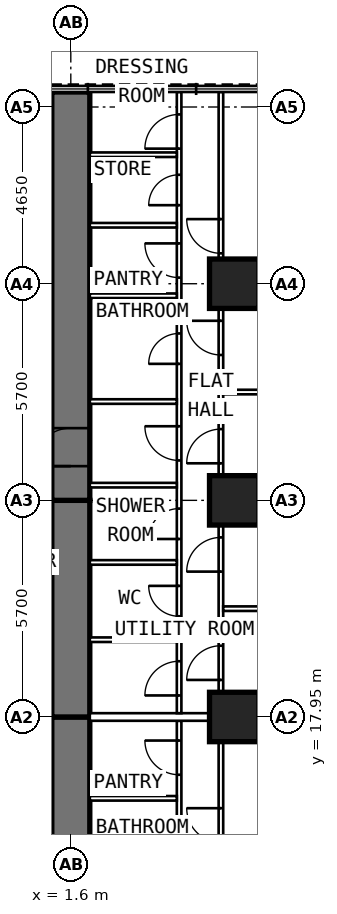
"""IFC4 building model, lengths in metres.
Left out: names, types, materials, properties, quantities, classifications, styles, units other than length and angle.
Written with IfcOpenShell. Run it as: python <this file> out.ifc"""

import sys

from ifc_helpers import new_model, si_unit, direction, frame, frame_2d, origin, origin_2d, place, context, subcontext, project, spatial, rectangle, extrude, element, fill, save


model = new_model("IFC4")
c1 = context("Model", 3, precision=1e-05, world=origin(), true_north=direction((0.0, 1.0)))
c2 = subcontext(c1, "Body", "Model", "MODEL_VIEW")
j1 = project(units=[si_unit("LENGTHUNIT", "METRE"), si_unit("PLANEANGLEUNIT", "RADIAN")], contexts=[c1])
p1 = place(None, origin())
s1 = spatial("IfcSite", under=j1, at=p1, CompositionType="ELEMENT")
p2 = place(p1, origin())
s2 = spatial("IfcBuilding", under=s1, at=p2, CompositionType="ELEMENT")
p3 = place(p2, frame((0.0, 0.0, 39.4)))
s3 = spatial("IfcBuildingStorey", under=s2, at=p3, CompositionType="ELEMENT", Elevation=39.4)
for number, where, z_axis, x_axis in (
    (1, (5.9, 17.95, 0.0), (0.0, 0.0, 1.0), (0.0, 1.0, 0.0)),
    (2, (5.9, 23.65, 0.0), (0.0, 0.0, 1.0), (0.0, 1.0, 0.0)),
    (3, (5.9, 29.35, 0.0), (0.0, 0.0, 1.0), (0.0, 1.0, 0.0)),
):
    element("IfcColumn", number, at=place(p3, frame(where, z_axis=z_axis, x_axis=x_axis)), inside=s3, PredefinedType="COLUMN", context=c2, shape_type="SweptSolid", body=[
        extrude(rectangle(XDim=1.3, YDim=1.3, at=origin_2d()), origin(), (0.0, 0.0, 1.0), 3.6),
    ])
p4 = place(p3, frame((1.6, 9.6, 0.0), z_axis=(0.0, 0.0, 1.0), x_axis=(0.0, 1.0, 0.0)))
e4 = element("IfcWall", 4, at=p4, inside=s3, PredefinedType="SHEAR", context=c2, shape_type="SweptSolid", body=[
    extrude(rectangle(XDim=8.35, YDim=1.0, at=frame_2d((4.175, 0.0))), origin(), (0.0, 0.0, 1.0), 3.6),
])
p5 = place(p4, frame((1.3, 0.0, 0.0)))
e5 = element("IfcOpeningElement", 5, at=p5, cuts=e4, PredefinedType="OPENING", context=c2, shape_type="SweptSolid", body=[
    extrude(rectangle(XDim=1.0, YDim=2.1, at=frame_2d((0.5, 1.05))), frame((0.0, 0.512, 0.0), z_axis=(0.0, -1.0, 0.0), x_axis=(1.0, 0.0, 0.0)), (0.0, 0.0, 1.0), 1.024),
])
p6 = place(p3, frame((1.6, 17.95, 0.0), z_axis=(0.0, 0.0, 1.0), x_axis=(0.0, 1.0, 0.0)))
e6 = element("IfcWall", 6, at=p6, inside=s3, PredefinedType="SHEAR", context=c2, shape_type="SweptSolid", body=[
    extrude(rectangle(XDim=5.7, YDim=1.0, at=frame_2d((2.85, 0.0))), origin(), (0.0, 0.0, 1.0), 3.6),
])
p7 = place(p3, frame((1.6, 23.65, 0.0), z_axis=(0.0, 0.0, 1.0), x_axis=(0.0, 1.0, 0.0)))
e7 = element("IfcWall", 7, at=p7, inside=s3, PredefinedType="SHEAR", context=c2, shape_type="SweptSolid", body=[
    extrude(rectangle(XDim=10.745, YDim=1.0, at=frame_2d((5.373, 0.0))), origin(), (0.0, 0.0, 1.0), 3.6),
])
p8 = place(p7, frame((0.9, 0.0, 0.0)))
e8 = element("IfcOpeningElement", 8, at=p8, cuts=e7, PredefinedType="OPENING", context=c2, shape_type="SweptSolid", body=[
    extrude(rectangle(XDim=1.0, YDim=2.1, at=frame_2d((0.5, 1.05))), frame((0.0, 0.512, 0.0), z_axis=(0.0, -1.0, 0.0), x_axis=(1.0, 0.0, 0.0)), (0.0, 0.0, 1.0), 1.024),
])
p9 = place(p3, frame((4.45, 10.1, 0.0), z_axis=(0.0, 0.0, 1.0), x_axis=(0.0, 1.0, 0.0)))
e9 = element("IfcWall", 9, at=p9, inside=s3, PredefinedType="PARTITIONING", context=c2, shape_type="SweptSolid", body=[
    extrude(rectangle(XDim=7.75, YDim=0.12, at=frame_2d((3.875, 0.0))), origin(), (0.0, 0.0, 1.0), 3.35),
])
p10 = place(p9, frame((0.75, 0.0, 0.0)))
e10 = element("IfcOpeningElement", 10, at=p10, cuts=e9, PredefinedType="OPENING", context=c2, shape_type="SweptSolid", body=[
    extrude(rectangle(XDim=0.9, YDim=2.1, at=frame_2d((0.45, 1.05))), frame((0.0, 0.072, 0.0), z_axis=(0.0, -1.0, 0.0), x_axis=(1.0, 0.0, 0.0)), (0.0, 0.0, 1.0), 0.144),
])
p11 = place(p9, frame((3.705, 0.0, 0.0)))
e11 = element("IfcOpeningElement", 11, at=p11, cuts=e9, PredefinedType="OPENING", context=c2, shape_type="SweptSolid", body=[
    extrude(rectangle(XDim=0.8, YDim=2.1, at=frame_2d((0.4, 1.05))), frame((0.0, 0.072, 0.0), z_axis=(0.0, -1.0, 0.0), x_axis=(1.0, 0.0, 0.0)), (0.0, 0.0, 1.0), 0.144),
])
p12 = place(p9, frame((6.33, 0.0, 0.0)))
e12 = element("IfcOpeningElement", 12, at=p12, cuts=e9, PredefinedType="OPENING", context=c2, shape_type="SweptSolid", body=[
    extrude(rectangle(XDim=0.9, YDim=2.1, at=frame_2d((0.45, 1.05))), frame((0.0, 0.072, 0.0), z_axis=(0.0, -1.0, 0.0), x_axis=(1.0, 0.0, 0.0)), (0.0, 0.0, 1.0), 0.144),
])
p13 = place(p3, frame((5.55, 9.691, 0.0), z_axis=(0.0, 0.0, 1.0), x_axis=(0.0, 1.0, 0.0)))
e13 = element("IfcWall", 13, at=p13, inside=s3, PredefinedType="PARTITIONING", context=c2, shape_type="SweptSolid", body=[
    extrude(rectangle(XDim=8.009, YDim=0.12, at=frame_2d((4.004, 0.0))), origin(), (0.0, 0.0, 1.0), 3.35),
])
p14 = place(p13, frame((4.959, 0.0, 0.0)))
e14 = element("IfcOpeningElement", 14, at=p14, cuts=e13, PredefinedType="OPENING", context=c2, shape_type="SweptSolid", body=[
    extrude(rectangle(XDim=0.9, YDim=2.1, at=frame_2d((0.45, 1.05))), frame((0.0, 0.072, 0.0), z_axis=(0.0, -1.0, 0.0), x_axis=(1.0, 0.0, 0.0)), (0.0, 0.0, 1.0), 0.144),
])
p15 = place(p3, frame((2.1, 15.81, 0.0), z_axis=(0.0, 0.0, 1.0), x_axis=(1.0, 0.0, 0.0)))
e15 = element("IfcWall", 15, at=p15, inside=s3, PredefinedType="PARTITIONING", context=c2, shape_type="SweptSolid", body=[
    extrude(rectangle(XDim=2.29, YDim=0.12, at=frame_2d((1.145, 0.0))), origin(), (0.0, 0.0, 1.0), 3.35),
])
p16 = place(p3, frame((4.45, 18.05, 0.0), z_axis=(0.0, 0.0, 1.0), x_axis=(0.0, 1.0, 0.0)))
e16 = element("IfcWall", 16, at=p16, inside=s3, PredefinedType="PARTITIONING", context=c2, shape_type="SweptSolid", body=[
    extrude(rectangle(XDim=16.345, YDim=0.12, at=frame_2d((8.172, 0.0))), origin(), (0.0, 0.0, 1.0), 3.35),
])
p17 = place(p16, frame((0.467, 0.0, 0.0)))
e17 = element("IfcOpeningElement", 17, at=p17, cuts=e16, PredefinedType="OPENING", context=c2, shape_type="SweptSolid", body=[
    extrude(rectangle(XDim=0.9, YDim=2.1, at=frame_2d((0.45, 1.05))), frame((0.0, 0.072, 0.0), z_axis=(0.0, -1.0, 0.0), x_axis=(1.0, 0.0, 0.0)), (0.0, 0.0, 1.0), 0.144),
])
p18 = place(p16, frame((2.55, 0.0, 0.0)))
e18 = element("IfcOpeningElement", 18, at=p18, cuts=e16, PredefinedType="OPENING", context=c2, shape_type="SweptSolid", body=[
    extrude(rectangle(XDim=0.8, YDim=2.1, at=frame_2d((0.4, 1.05))), frame((0.0, 0.072, 0.0), z_axis=(0.0, -1.0, 0.0), x_axis=(1.0, 0.0, 0.0)), (0.0, 0.0, 1.0), 0.144),
])
p19 = place(p16, frame((4.583, 0.0, 0.0)))
e19 = element("IfcOpeningElement", 19, at=p19, cuts=e16, PredefinedType="OPENING", context=c2, shape_type="SweptSolid", body=[
    extrude(rectangle(XDim=0.8, YDim=2.1, at=frame_2d((0.4, 1.05))), frame((0.0, 0.072, 0.0), z_axis=(0.0, -1.0, 0.0), x_axis=(1.0, 0.0, 0.0)), (0.0, 0.0, 1.0), 0.144),
])
p20 = place(p16, frame((6.65, 0.0, 0.0)))
e20 = element("IfcOpeningElement", 20, at=p20, cuts=e16, PredefinedType="OPENING", context=c2, shape_type="SweptSolid", body=[
    extrude(rectangle(XDim=0.9, YDim=2.1, at=frame_2d((0.45, 1.05))), frame((0.0, 0.072, 0.0), z_axis=(0.0, -1.0, 0.0), x_axis=(1.0, 0.0, 0.0)), (0.0, 0.0, 1.0), 0.144),
])
p21 = place(p16, frame((9.192, 0.0, 0.0)))
e21 = element("IfcOpeningElement", 21, at=p21, cuts=e16, PredefinedType="OPENING", context=c2, shape_type="SweptSolid", body=[
    extrude(rectangle(XDim=0.8, YDim=2.1, at=frame_2d((0.4, 1.05))), frame((0.0, 0.072, 0.0), z_axis=(0.0, -1.0, 0.0), x_axis=(1.0, 0.0, 0.0)), (0.0, 0.0, 1.0), 0.144),
])
p22 = place(p16, frame((11.461, 0.0, 0.0)))
e22 = element("IfcOpeningElement", 22, at=p22, cuts=e16, PredefinedType="OPENING", context=c2, shape_type="SweptSolid", body=[
    extrude(rectangle(XDim=0.9, YDim=2.1, at=frame_2d((0.45, 1.05))), frame((0.0, 0.072, 0.0), z_axis=(0.0, -1.0, 0.0), x_axis=(1.0, 0.0, 0.0)), (0.0, 0.0, 1.0), 0.144),
])
p23 = place(p16, frame((13.367, 0.0, 0.0)))
e23 = element("IfcOpeningElement", 23, at=p23, cuts=e16, PredefinedType="OPENING", context=c2, shape_type="SweptSolid", body=[
    extrude(rectangle(XDim=0.8, YDim=2.1, at=frame_2d((0.4, 1.05))), frame((0.0, 0.072, 0.0), z_axis=(0.0, -1.0, 0.0), x_axis=(1.0, 0.0, 0.0)), (0.0, 0.0, 1.0), 0.144),
])
p24 = place(p16, frame((14.854, 0.0, 0.0)))
e24 = element("IfcOpeningElement", 24, at=p24, cuts=e16, PredefinedType="OPENING", context=c2, shape_type="SweptSolid", body=[
    extrude(rectangle(XDim=0.9, YDim=2.1, at=frame_2d((0.45, 1.05))), frame((0.0, 0.072, 0.0), z_axis=(0.0, -1.0, 0.0), x_axis=(1.0, 0.0, 0.0)), (0.0, 0.0, 1.0), 0.144),
])
p25 = place(p3, frame((5.55, 18.05, 0.0), z_axis=(0.0, 0.0, 1.0), x_axis=(0.0, 1.0, 0.0)))
e25 = element("IfcWall", 25, at=p25, inside=s3, PredefinedType="PARTITIONING", context=c2, shape_type="SweptSolid", body=[
    extrude(rectangle(XDim=16.345, YDim=0.12, at=frame_2d((8.172, 0.0))), origin(), (0.0, 0.0, 1.0), 3.35),
])
p26 = place(p25, frame((0.875, 0.0, 0.0)))
e26 = element("IfcOpeningElement", 26, at=p26, cuts=e25, PredefinedType="OPENING", context=c2, shape_type="SweptSolid", body=[
    extrude(rectangle(XDim=0.9, YDim=2.1, at=frame_2d((0.45, 1.05))), frame((0.0, 0.072, 0.0), z_axis=(0.0, -1.0, 0.0), x_axis=(1.0, 0.0, 0.0)), (0.0, 0.0, 1.0), 0.144),
])
p27 = place(p25, frame((3.725, 0.0, 0.0)))
e27 = element("IfcOpeningElement", 27, at=p27, cuts=e25, PredefinedType="OPENING", context=c2, shape_type="SweptSolid", body=[
    extrude(rectangle(XDim=0.9, YDim=2.1, at=frame_2d((0.45, 1.05))), frame((0.0, 0.072, 0.0), z_axis=(0.0, -1.0, 0.0), x_axis=(1.0, 0.0, 0.0)), (0.0, 0.0, 1.0), 0.144),
])
p28 = place(p25, frame((6.575, 0.0, 0.0)))
e28 = element("IfcOpeningElement", 28, at=p28, cuts=e25, PredefinedType="OPENING", context=c2, shape_type="SweptSolid", body=[
    extrude(rectangle(XDim=0.9, YDim=2.1, at=frame_2d((0.45, 1.05))), frame((0.0, 0.072, 0.0), z_axis=(0.0, -1.0, 0.0), x_axis=(1.0, 0.0, 0.0)), (0.0, 0.0, 1.0), 0.144),
])
p29 = place(p25, frame((9.425, 0.0, 0.0)))
e29 = element("IfcOpeningElement", 29, at=p29, cuts=e25, PredefinedType="OPENING", context=c2, shape_type="SweptSolid", body=[
    extrude(rectangle(XDim=0.9, YDim=2.1, at=frame_2d((0.45, 1.05))), frame((0.0, 0.072, 0.0), z_axis=(0.0, -1.0, 0.0), x_axis=(1.0, 0.0, 0.0)), (0.0, 0.0, 1.0), 0.144),
])
p30 = place(p25, frame((12.1, 0.0, 0.0)))
e30 = element("IfcOpeningElement", 30, at=p30, cuts=e25, PredefinedType="OPENING", context=c2, shape_type="SweptSolid", body=[
    extrude(rectangle(XDim=0.9, YDim=2.1, at=frame_2d((0.45, 1.05))), frame((0.0, 0.072, 0.0), z_axis=(0.0, -1.0, 0.0), x_axis=(1.0, 0.0, 0.0)), (0.0, 0.0, 1.0), 0.144),
])
p31 = place(p3, frame((5.61, 20.8, 0.0), z_axis=(0.0, 0.0, 1.0), x_axis=(1.0, 0.0, 0.0)))
e31 = element("IfcWall", 31, at=p31, inside=s3, PredefinedType="PARTITIONING", context=c2, shape_type="SweptSolid", body=[
    extrude(rectangle(XDim=5.09, YDim=0.12, at=frame_2d((2.545, 0.0))), origin(), (0.0, 0.0, 1.0), 3.35),
])
p32 = place(p3, frame((5.61, 23.65, 0.0), z_axis=(0.0, 0.0, 1.0), x_axis=(1.0, 0.0, 0.0)))
e32 = element("IfcWall", 32, at=p32, inside=s3, PredefinedType="PARTITIONING", context=c2, shape_type="SweptSolid", body=[
    extrude(rectangle(XDim=5.09, YDim=0.12, at=frame_2d((2.545, 0.0))), origin(), (0.0, 0.0, 1.0), 2.45),
])
p33 = place(p3, frame((5.61, 26.5, 0.0), z_axis=(0.0, 0.0, 1.0), x_axis=(1.0, 0.0, 0.0)))
e33 = element("IfcWall", 33, at=p33, inside=s3, PredefinedType="PARTITIONING", context=c2, shape_type="SweptSolid", body=[
    extrude(rectangle(XDim=5.09, YDim=0.12, at=frame_2d((2.545, 0.0))), origin(), (0.0, 0.0, 1.0), 3.35),
])
p34 = place(p3, frame((5.61, 29.35, 0.0), z_axis=(0.0, 0.0, 1.0), x_axis=(1.0, 0.0, 0.0)))
e34 = element("IfcWall", 34, at=p34, inside=s3, PredefinedType="PARTITIONING", context=c2, shape_type="SweptSolid", body=[
    extrude(rectangle(XDim=5.09, YDim=0.12, at=frame_2d((2.545, 0.0))), origin(), (0.0, 0.0, 1.0), 2.45),
])
for number, where, z_axis, x_axis in (
    (35, (2.1, 19.983, 0.0), (0.0, 0.0, 1.0), (1.0, 0.0, 0.0)),
    (36, (2.1, 22.017, 0.0), (0.0, 0.0, 1.0), (1.0, 0.0, 0.0)),
    (37, (2.1, 24.05, 0.0), (0.0, 0.0, 1.0), (1.0, 0.0, 0.0)),
    (38, (2.1, 26.25, 0.0), (0.0, 0.0, 1.0), (1.0, 0.0, 0.0)),
):
    element("IfcWall", number, at=place(p3, frame(where, z_axis=z_axis, x_axis=x_axis)), inside=s3, PredefinedType="PARTITIONING", context=c2, shape_type="SweptSolid", body=[
        extrude(rectangle(XDim=2.29, YDim=0.12, at=frame_2d((1.145, 0.0))), origin(), (0.0, 0.0, 1.0), 3.35),
    ])
p35 = place(p3, frame((2.1, 29.033, 0.0), z_axis=(0.0, 0.0, 1.0), x_axis=(1.0, 0.0, 0.0)))
e39 = element("IfcWall", 39, at=p35, inside=s3, PredefinedType="PARTITIONING", context=c2, shape_type="SweptSolid", body=[
    extrude(rectangle(XDim=2.29, YDim=0.12, at=frame_2d((1.145, 0.0))), origin(), (0.0, 0.0, 1.0), 2.45),
])
for number, where, z_axis, x_axis in (
    (40, (2.1, 30.889, 0.0), (0.0, 0.0, 1.0), (1.0, 0.0, 0.0)),
    (41, (2.1, 32.744, 0.0), (0.0, 0.0, 1.0), (1.0, 0.0, 0.0)),
):
    element("IfcWall", number, at=place(p3, frame(where, z_axis=z_axis, x_axis=x_axis)), inside=s3, PredefinedType="PARTITIONING", context=c2, shape_type="SweptSolid", body=[
        extrude(rectangle(XDim=2.29, YDim=0.12, at=frame_2d((1.145, 0.0))), origin(), (0.0, 0.0, 1.0), 3.35),
    ])
p36 = place(p3, frame((2.1, 17.95, 0.0), z_axis=(0.0, 0.0, 1.0), x_axis=(1.0, 0.0, 0.0)))
e42 = element("IfcWall", 42, at=p36, inside=s3, PredefinedType="PARTITIONING", context=c2, shape_type="SweptSolid", body=[
    extrude(rectangle(XDim=8.6, YDim=0.2, at=frame_2d((4.3, 0.0))), origin(), (0.0, 0.0, 1.0), 2.45),
])
p37 = place(p14, origin())
e43 = element("IfcDoor", 43, at=p37, inside=s3, OperationType="SINGLE_SWING_RIGHT", PredefinedType="DOOR", context=c2, shape_type="SweptSolid", body=[
    extrude(rectangle(XDim=0.9, YDim=2.1, at=frame_2d((0.45, 1.05))), frame((0.0, 0.025, 0.0), z_axis=(0.0, -1.0, 0.0), x_axis=(1.0, 0.0, 0.0)), (0.0, 0.0, 1.0), 0.05),
])
fill(e14, e43)
p38 = place(p12, origin())
e44 = element("IfcDoor", 44, at=p38, inside=s3, OperationType="SINGLE_SWING_RIGHT", PredefinedType="DOOR", context=c2, shape_type="SweptSolid", body=[
    extrude(rectangle(XDim=0.9, YDim=2.1, at=frame_2d((0.45, 1.05))), frame((0.0, 0.025, 0.0), z_axis=(0.0, -1.0, 0.0), x_axis=(1.0, 0.0, 0.0)), (0.0, 0.0, 1.0), 0.05),
])
fill(e12, e44)
p39 = place(p8, origin())
e45 = element("IfcDoor", 45, at=p39, inside=s3, OperationType="SINGLE_SWING_LEFT", PredefinedType="DOOR", context=c2, shape_type="SweptSolid", body=[
    extrude(rectangle(XDim=1.0, YDim=2.1, at=frame_2d((0.5, 1.05))), frame((0.0, 0.25, 0.0), z_axis=(0.0, -1.0, 0.0), x_axis=(1.0, 0.0, 0.0)), (0.0, 0.0, 1.0), 0.5),
])
fill(e8, e45)
p40 = place(p26, origin())
e46 = element("IfcDoor", 46, at=p40, inside=s3, OperationType="SINGLE_SWING_LEFT", PredefinedType="DOOR", context=c2, shape_type="SweptSolid", body=[
    extrude(rectangle(XDim=0.9, YDim=2.1, at=frame_2d((0.45, 1.05))), frame((0.0, 0.025, 0.0), z_axis=(0.0, -1.0, 0.0), x_axis=(1.0, 0.0, 0.0)), (0.0, 0.0, 1.0), 0.05),
])
fill(e26, e46)
p41 = place(p27, origin())
e47 = element("IfcDoor", 47, at=p41, inside=s3, OperationType="SINGLE_SWING_LEFT", PredefinedType="DOOR", context=c2, shape_type="SweptSolid", body=[
    extrude(rectangle(XDim=0.9, YDim=2.1, at=frame_2d((0.45, 1.05))), frame((0.0, 0.025, 0.0), z_axis=(0.0, -1.0, 0.0), x_axis=(1.0, 0.0, 0.0)), (0.0, 0.0, 1.0), 0.05),
])
fill(e27, e47)
p42 = place(p28, origin())
e48 = element("IfcDoor", 48, at=p42, inside=s3, OperationType="SINGLE_SWING_LEFT", PredefinedType="DOOR", context=c2, shape_type="SweptSolid", body=[
    extrude(rectangle(XDim=0.9, YDim=2.1, at=frame_2d((0.45, 1.05))), frame((0.0, 0.025, 0.0), z_axis=(0.0, -1.0, 0.0), x_axis=(1.0, 0.0, 0.0)), (0.0, 0.0, 1.0), 0.05),
])
fill(e28, e48)
p43 = place(p29, origin())
e49 = element("IfcDoor", 49, at=p43, inside=s3, OperationType="SINGLE_SWING_RIGHT", PredefinedType="DOOR", context=c2, shape_type="SweptSolid", body=[
    extrude(rectangle(XDim=0.9, YDim=2.1, at=frame_2d((0.45, 1.05))), frame((0.0, 0.025, 0.0), z_axis=(0.0, -1.0, 0.0), x_axis=(1.0, 0.0, 0.0)), (0.0, 0.0, 1.0), 0.05),
])
fill(e29, e49)
p44 = place(p30, origin())
e50 = element("IfcDoor", 50, at=p44, inside=s3, OperationType="SINGLE_SWING_RIGHT", PredefinedType="DOOR", context=c2, shape_type="SweptSolid", body=[
    extrude(rectangle(XDim=0.9, YDim=2.1, at=frame_2d((0.45, 1.05))), frame((0.0, 0.025, 0.0), z_axis=(0.0, -1.0, 0.0), x_axis=(1.0, 0.0, 0.0)), (0.0, 0.0, 1.0), 0.05),
])
fill(e30, e50)
p45 = place(p17, origin())
e51 = element("IfcDoor", 51, at=p45, inside=s3, OperationType="SINGLE_SWING_LEFT", PredefinedType="DOOR", context=c2, shape_type="SweptSolid", body=[
    extrude(rectangle(XDim=0.9, YDim=2.1, at=frame_2d((0.45, 1.05))), frame((0.0, 0.025, 0.0), z_axis=(0.0, -1.0, 0.0), x_axis=(1.0, 0.0, 0.0)), (0.0, 0.0, 1.0), 0.05),
])
fill(e17, e51)
p46 = place(p18, origin())
e52 = element("IfcDoor", 52, at=p46, inside=s3, OperationType="SINGLE_SWING_RIGHT", PredefinedType="DOOR", context=c2, shape_type="SweptSolid", body=[
    extrude(rectangle(XDim=0.8, YDim=2.1, at=frame_2d((0.4, 1.05))), frame((0.0, 0.025, 0.0), z_axis=(0.0, -1.0, 0.0), x_axis=(1.0, 0.0, 0.0)), (0.0, 0.0, 1.0), 0.05),
])
fill(e18, e52)
p47 = place(p19, origin())
e53 = element("IfcDoor", 53, at=p47, inside=s3, OperationType="SINGLE_SWING_LEFT", PredefinedType="DOOR", context=c2, shape_type="SweptSolid", body=[
    extrude(rectangle(XDim=0.8, YDim=2.1, at=frame_2d((0.4, 1.05))), frame((0.0, 0.025, 0.0), z_axis=(0.0, -1.0, 0.0), x_axis=(1.0, 0.0, 0.0)), (0.0, 0.0, 1.0), 0.05),
])
fill(e19, e53)
p48 = place(p20, origin())
e54 = element("IfcDoor", 54, at=p48, inside=s3, OperationType="SINGLE_SWING_RIGHT", PredefinedType="DOOR", context=c2, shape_type="SweptSolid", body=[
    extrude(rectangle(XDim=0.9, YDim=2.1, at=frame_2d((0.45, 1.05))), frame((0.0, 0.025, 0.0), z_axis=(0.0, -1.0, 0.0), x_axis=(1.0, 0.0, 0.0)), (0.0, 0.0, 1.0), 0.05),
])
fill(e20, e54)
p49 = place(p21, origin())
e55 = element("IfcDoor", 55, at=p49, inside=s3, OperationType="SINGLE_SWING_LEFT", PredefinedType="DOOR", context=c2, shape_type="SweptSolid", body=[
    extrude(rectangle(XDim=0.8, YDim=2.1, at=frame_2d((0.4, 1.05))), frame((0.0, 0.025, 0.0), z_axis=(0.0, -1.0, 0.0), x_axis=(1.0, 0.0, 0.0)), (0.0, 0.0, 1.0), 0.05),
])
fill(e21, e55)
p50 = place(p22, origin())
e56 = element("IfcDoor", 56, at=p50, inside=s3, OperationType="SINGLE_SWING_RIGHT", PredefinedType="DOOR", context=c2, shape_type="SweptSolid", body=[
    extrude(rectangle(XDim=0.9, YDim=2.1, at=frame_2d((0.45, 1.05))), frame((0.0, 0.025, 0.0), z_axis=(0.0, -1.0, 0.0), x_axis=(1.0, 0.0, 0.0)), (0.0, 0.0, 1.0), 0.05),
])
fill(e22, e56)
p51 = place(p23, origin())
e57 = element("IfcDoor", 57, at=p51, inside=s3, OperationType="SINGLE_SWING_LEFT", PredefinedType="DOOR", context=c2, shape_type="SweptSolid", body=[
    extrude(rectangle(XDim=0.8, YDim=2.1, at=frame_2d((0.4, 1.05))), frame((0.0, 0.025, 0.0), z_axis=(0.0, -1.0, 0.0), x_axis=(1.0, 0.0, 0.0)), (0.0, 0.0, 1.0), 0.05),
])
fill(e23, e57)
p52 = place(p24, origin())
e58 = element("IfcDoor", 58, at=p52, inside=s3, OperationType="SINGLE_SWING_LEFT", PredefinedType="DOOR", context=c2, shape_type="SweptSolid", body=[
    extrude(rectangle(XDim=0.9, YDim=2.1, at=frame_2d((0.45, 1.05))), frame((0.0, 0.025, 0.0), z_axis=(0.0, -1.0, 0.0), x_axis=(1.0, 0.0, 0.0)), (0.0, 0.0, 1.0), 0.05),
])
fill(e24, e58)
save(model, sys.argv[1])
